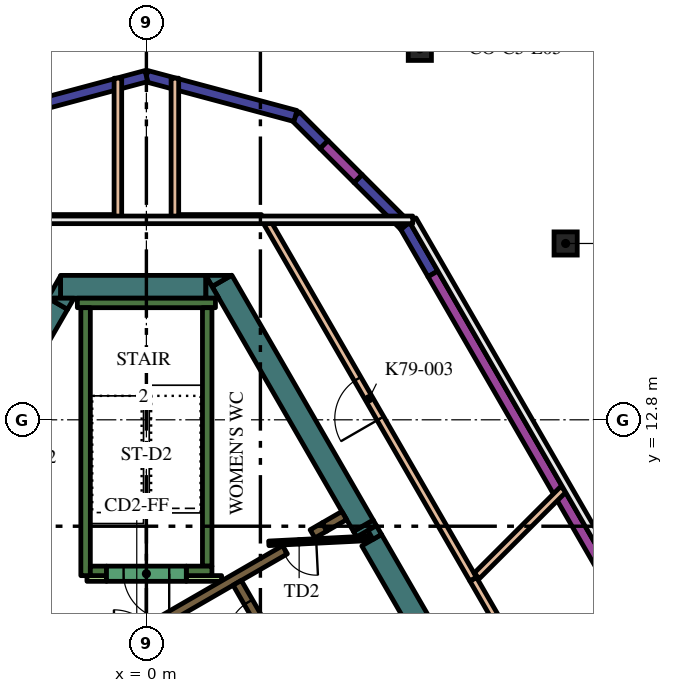
"""IFC4 building model, lengths in metres.
Left out: names, types, materials, properties, quantities, classifications, styles, units other than length and angle.
Written with IfcOpenShell. Run it as: python <this file> out.ifc"""

import sys

from ifc_helpers import new_model, si_unit, direction, frame, frame_2d, origin, origin_2d, place, context, subcontext, project, spatial, polyline, rectangle, hollow_circle, outline, extrude, element, fill, save


model = new_model("IFC4")
c1 = context("Model", 3, precision=1e-05, world=origin(), true_north=direction((0.0, 1.0)))
c2 = subcontext(c1, "Body", "Model", "MODEL_VIEW")
j1 = project(units=[si_unit("LENGTHUNIT", "METRE"), si_unit("PLANEANGLEUNIT", "RADIAN")], contexts=[c1])
p1 = place(None, origin())
s1 = spatial("IfcSite", under=j1, at=p1, CompositionType="ELEMENT")
p2 = place(p1, origin())
s2 = spatial("IfcBuilding", under=s1, at=p2, CompositionType="ELEMENT")
p3 = place(p2, frame((0.0, 0.0, 340.2)))
s3 = spatial("IfcBuildingStorey", under=s2, at=p3, CompositionType="ELEMENT", Elevation=340.2)
for number, where, z_axis, x_axis in (
    (1, (11.032, 17.44, 0.0), (0.0, 0.0, 1.0), (1.0, 0.0, 0.0)),
    (2, (7.195, 22.561, 0.0), (0.0, 0.0, 1.0), (1.0, 0.0, 0.0)),
):
    element("IfcColumn", number, at=place(p3, frame(where, z_axis=z_axis, x_axis=x_axis)), inside=s3, PredefinedType="COLUMN", context=c2, shape_type="SweptSolid", body=[
        extrude(hollow_circle(Radius=0.305, WallThickness=0.025, at=origin_2d()), origin(), (0.0, 0.0, 1.0), 4.2),
    ])
p4 = place(p3, frame((5.709, 10.012, 0.0), z_axis=(0.0, 0.0, 1.0), x_axis=(0.500399834964, -0.865794435861, 0.0)))
e3 = element("IfcWall", 3, at=p4, inside=s3, PredefinedType="SOLIDWALL", context=c2, shape_type="SweptSolid", body=[
    extrude(rectangle(XDim=0.166, YDim=0.6, at=frame_2d((0.083, 0.0))), origin(), (0.0, 0.0, 1.0), 4.2),
])
p5 = place(p3, frame((5.928, 9.633, 0.0), z_axis=(0.0, 0.0, 1.0), x_axis=(0.499983823482, -0.8660347431, 0.0)))
e4 = element("IfcWall", 4, at=p5, inside=s3, PredefinedType="SOLIDWALL", context=c2, shape_type="SweptSolid", body=[
    extrude(rectangle(XDim=4.528, YDim=0.6, at=frame_2d((2.264, 0.0))), origin(), (0.0, 0.0, 1.0), 4.2),
])
p6 = place(p3, origin())
e5 = element("IfcWall", 5, at=p6, inside=s3, PredefinedType="SOLIDWALL", context=c2, shape_type="SweptSolid", body=[
    extrude(outline(polyline([(6.053, 10.016), (6.187, 9.784), (5.961, 9.654), (5.827, 9.886), (6.053, 10.016)])), origin(), (0.0, 0.0, 1.0), 4.2),
])
p7 = place(p3, frame((1.989, 16.456, 0.0), z_axis=(0.0, 0.0, 1.0), x_axis=(0.499990476767, -0.866030901956, 0.0)))
e6 = element("IfcWall", 6, at=p7, inside=s3, PredefinedType="SOLIDWALL", context=c2, shape_type="SweptSolid", body=[
    extrude(rectangle(XDim=7.438, YDim=0.6, at=frame_2d((3.719, 0.0))), origin(), (0.0, 0.0, 1.0), 4.2),
])
e7 = element("IfcWall", 7, at=p6, inside=s3, PredefinedType="SOLIDWALL", context=c2, shape_type="SweptSolid", body=[
    extrude(outline(polyline([(1.559, 16.6), (2.235, 16.6), (1.728, 16.307), (1.559, 16.6)])), origin(), (0.0, 0.0, 1.0), 4.2),
])
p8 = place(p3, frame((-2.258, 16.3, 0.0), z_axis=(0.0, 0.0, 1.0), x_axis=(1.0, 0.0, 0.0)))
e8 = element("IfcWall", 8, at=p8, inside=s3, PredefinedType="SOLIDWALL", context=c2, shape_type="SweptSolid", body=[
    extrude(rectangle(XDim=3.823, YDim=0.6, at=frame_2d((1.912, 0.0))), origin(), (0.0, 0.0, 1.0), 4.2),
])
e9 = element("IfcWall", 9, at=p6, inside=s3, PredefinedType="SOLIDWALL", context=c2, shape_type="SweptSolid", body=[
    extrude(outline(polyline([(1.905, 16.0), (1.567, 16.0), (1.567, 16.585), (1.905, 16.0)])), origin(), (0.0, 0.0, 1.0), 4.2),
])
e10 = element("IfcWall", 10, at=p6, inside=s3, PredefinedType="SOLIDWALL", context=c2, shape_type="SweptSolid", body=[
    extrude(outline(polyline([(-2.598, 16.0), (-2.26, 16.585), (-2.26, 16.0), (-2.598, 16.0)])), origin(), (0.0, 0.0, 1.0), 4.2),
])
p9 = place(p3, frame((-2.335, 15.855, 0.0), z_axis=(0.0, 0.0, 1.0), x_axis=(-0.499960127962, -0.866048422692, 0.0)))
e11 = element("IfcWall", 11, at=p9, inside=s3, PredefinedType="SOLIDWALL", context=c2, shape_type="SweptSolid", body=[
    extrude(rectangle(XDim=2.934, YDim=0.6, at=frame_2d((1.467, 0.0))), origin(), (0.0, 0.0, 1.0), 4.2),
])
e12 = element("IfcWall", 12, at=p6, inside=s3, PredefinedType="SOLIDWALL", context=c2, shape_type="SweptSolid", body=[
    extrude(outline(polyline([(-1.905, 16.0), (-2.074, 15.707), (-2.581, 16.0), (-1.905, 16.0)])), origin(), (0.0, 0.0, 1.0), 4.2),
])
p10 = place(p3, frame((-1.817, 15.875, 0.0), z_axis=(0.0, 0.0, 1.0), x_axis=(1.0, 0.0, 0.0)))
e13 = element("IfcWall", 13, at=p10, inside=s3, PredefinedType="SOLIDWALL", context=c2, shape_type="SweptSolid", body=[
    extrude(rectangle(XDim=3.634, YDim=0.25, at=frame_2d((1.817, 0.0))), origin(), (0.0, 0.0, 1.0), 4.2),
])
p11 = place(p3, frame((1.6, 8.95, 0.0), z_axis=(0.0, 0.0, 1.0), x_axis=(0.0, 1.0, 0.0)))
e14 = element("IfcWall", 14, at=p11, inside=s3, PredefinedType="SOLIDWALL", context=c2, shape_type="SweptSolid", body=[
    extrude(rectangle(XDim=6.8, YDim=0.25, at=frame_2d((3.4, 0.0))), origin(), (0.0, 0.0, 1.0), 4.2),
])
p12 = place(p3, frame((1.05, 8.825, 0.0), z_axis=(0.0, 0.0, 1.0), x_axis=(1.0, 0.0, 0.0)))
e15 = element("IfcWall", 15, at=p12, inside=s3, PredefinedType="SOLIDWALL", context=c2, shape_type="SweptSolid", body=[
    extrude(rectangle(XDim=0.675, YDim=0.25, at=frame_2d((0.337, 0.0))), origin(), (0.0, 0.0, 1.0), 4.2),
])
p13 = place(p3, frame((-1.6, 8.7, 0.0), z_axis=(0.0, 0.0, 1.0), x_axis=(0.0, 1.0, 0.0)))
e16 = element("IfcWall", 16, at=p13, inside=s3, PredefinedType="SOLIDWALL", context=c2, shape_type="SweptSolid", body=[
    extrude(rectangle(XDim=7.05, YDim=0.25, at=frame_2d((3.525, 0.0))), origin(), (0.0, 0.0, 1.0), 4.2),
])
p14 = place(p3, frame((-1.475, 8.825, 0.0), z_axis=(0.0, 0.0, 1.0), x_axis=(1.0, 0.0, 0.0)))
e17 = element("IfcWall", 17, at=p14, inside=s3, PredefinedType="SOLIDWALL", context=c2, shape_type="SweptSolid", body=[
    extrude(rectangle(XDim=0.425, YDim=0.25, at=frame_2d((0.212, 0.0))), origin(), (0.0, 0.0, 1.0), 4.2),
])
p15 = place(p3, frame((3.647, 9.38, 0.0), z_axis=(0.0, 0.0, 1.0), x_axis=(-0.866027868628, -0.499995730742, 0.0)))
e18 = element("IfcWall", 18, at=p15, inside=s3, PredefinedType="SOLIDWALL", context=c2, shape_type="SweptSolid", body=[
    extrude(rectangle(XDim=4.099, YDim=0.25, at=frame_2d((2.049, 0.0))), origin(), (0.0, 0.0, 1.0), 4.2),
])
p16 = place(p3, frame((4.688, 9.981, 0.0), z_axis=(0.0, 0.0, 1.0), x_axis=(-0.865974312977, -0.500088481434, 0.0)))
e19 = element("IfcWall", 19, at=p16, inside=s3, PredefinedType="SOLIDWALL", context=c2, shape_type="SweptSolid", body=[
    extrude(rectangle(XDim=0.366, YDim=0.25, at=frame_2d((0.183, 0.0))), origin(), (0.0, 0.0, 1.0), 4.2),
])
p17 = place(p3, frame((4.689, 9.982, 0.0), z_axis=(0.0, 0.0, 1.0), x_axis=(0.865947592822, 0.500134748329, 0.0)))
e20 = element("IfcWall", 20, at=p17, inside=s3, PredefinedType="SOLIDWALL", context=c2, shape_type="SweptSolid", body=[
    extrude(rectangle(XDim=0.598, YDim=0.25, at=frame_2d((0.299, 0.0))), origin(), (0.0, 0.0, 1.0), 4.2),
])
p18 = place(p3, frame((1.05, 8.625, 0.0), z_axis=(0.0, 0.0, 1.0), x_axis=(1.0, 0.0, 0.0)))
e21 = element("IfcWall", 21, at=p18, inside=s3, PredefinedType="PARTITIONING", context=c2, shape_type="SweptSolid", body=[
    extrude(rectangle(XDim=0.929, YDim=0.15, at=frame_2d((0.464, 0.0))), origin(), (0.0, 0.0, 1.0), 3.45),
])
p19 = place(p3, frame((-1.564, 8.625, 0.0), z_axis=(0.0, 0.0, 1.0), x_axis=(1.0, 0.0, 0.0)))
e22 = element("IfcWall", 22, at=p19, inside=s3, PredefinedType="PARTITIONING", context=c2, shape_type="SweptSolid", body=[
    extrude(rectangle(XDim=0.514, YDim=0.15, at=frame_2d((0.257, 0.0))), origin(), (0.0, 0.0, 1.0), 3.45),
])
p20 = place(p3, frame((8.565, -2.185, 0.0), z_axis=(0.0, 0.0, 1.0), x_axis=(-0.499997954832, 0.866026584559, 0.0)))
e23 = element("IfcWall", 23, at=p20, inside=s3, PredefinedType="SOLIDWALL", context=c2, shape_type="SweptSolid", body=[
    extrude(rectangle(XDim=12.35, YDim=0.25, at=frame_2d((6.175, 0.0))), origin(), (0.0, 0.0, 1.0), 4.2),
])
p21 = place(p20, frame((0.685, 0.0, 0.0)))
e24 = element("IfcOpeningElement", 24, at=p21, cuts=e23, PredefinedType="OPENING", context=c2, shape_type="SweptSolid", body=[
    extrude(rectangle(XDim=0.9, YDim=2.1, at=frame_2d((0.45, 1.05))), frame((0.0, 0.135, 0.0), z_axis=(0.0, -1.0, 0.0), x_axis=(1.0, 0.0, 0.0)), (0.0, 0.0, 1.0), 0.27),
])
p22 = place(p20, frame((3.105, 0.0, 0.0)))
e25 = element("IfcOpeningElement", 25, at=p22, cuts=e23, PredefinedType="OPENING", context=c2, shape_type="SweptSolid", body=[
    extrude(rectangle(XDim=1.1, YDim=2.1, at=frame_2d((0.55, 1.05))), frame((0.0, 0.135, 0.0), z_axis=(0.0, -1.0, 0.0), x_axis=(1.0, 0.0, 0.0)), (0.0, 0.0, 1.0), 0.27),
])
p23 = place(p20, frame((5.625, 0.0, 0.0)))
e26 = element("IfcOpeningElement", 26, at=p23, cuts=e23, PredefinedType="OPENING", context=c2, shape_type="SweptSolid", body=[
    extrude(rectangle(XDim=1.1, YDim=2.1, at=frame_2d((0.55, 1.05))), frame((0.0, 0.135, 0.0), z_axis=(0.0, -1.0, 0.0), x_axis=(1.0, 0.0, 0.0)), (0.0, 0.0, 1.0), 0.27),
])
p24 = place(p20, frame((8.145, 0.0, 0.0)))
e27 = element("IfcOpeningElement", 27, at=p24, cuts=e23, PredefinedType="OPENING", context=c2, shape_type="SweptSolid", body=[
    extrude(rectangle(XDim=1.1, YDim=2.1, at=frame_2d((0.55, 1.05))), frame((0.0, 0.135, 0.0), z_axis=(0.0, -1.0, 0.0), x_axis=(1.0, 0.0, 0.0)), (0.0, 0.0, 1.0), 0.27),
])
p25 = place(p20, frame((10.665, 0.0, 0.0)))
e28 = element("IfcOpeningElement", 28, at=p25, cuts=e23, PredefinedType="OPENING", context=c2, shape_type="SweptSolid", body=[
    extrude(rectangle(XDim=1.1, YDim=2.1, at=frame_2d((0.55, 1.05))), frame((0.0, 0.135, 0.0), z_axis=(0.0, -1.0, 0.0), x_axis=(1.0, 0.0, 0.0)), (0.0, 0.0, 1.0), 0.27),
])
p26 = place(p3, frame((1.05, 8.75, 0.0), z_axis=(0.0, 0.0, 1.0), x_axis=(-1.0, 0.0, 0.0)))
e29 = element("IfcWall", 29, at=p26, inside=s3, PredefinedType="SOLIDWALL", context=c2, shape_type="SweptSolid", body=[
    extrude(rectangle(XDim=2.1, YDim=0.4, at=frame_2d((1.05, 0.0))), origin(), (0.0, 0.0, 1.0), 4.2),
])
p27 = place(p26, frame((0.45, 0.0, 0.0)))
e30 = element("IfcOpeningElement", 30, at=p27, cuts=e29, PredefinedType="OPENING", context=c2, shape_type="SweptSolid", body=[
    extrude(rectangle(XDim=1.2, YDim=2.1, at=frame_2d((0.6, 1.05))), frame((0.0, 0.21, 0.0), z_axis=(0.0, -1.0, 0.0), x_axis=(1.0, 0.0, 0.0)), (0.0, 0.0, 1.0), 0.42),
])
p28 = place(p3, frame((5.917, 9.684, 0.0), z_axis=(0.0, 0.0, 1.0), x_axis=(-0.998758194515, -0.049820366212, 0.0)))
e31 = element("IfcWall", 31, at=p28, inside=s3, PredefinedType="PARTITIONING", context=c2, shape_type="SweptSolid", body=[
    extrude(rectangle(XDim=2.7, YDim=0.12, at=frame_2d((1.35, 0.0))), origin(), (0.0, 0.0, 1.0), 3.45),
])
p29 = place(p28, frame((1.45, 0.0, 0.0)))
e32 = element("IfcOpeningElement", 32, at=p29, cuts=e31, PredefinedType="OPENING", context=c2, shape_type="SweptSolid", body=[
    extrude(rectangle(XDim=0.9, YDim=2.1, at=frame_2d((0.45, 1.05))), frame((0.0, 0.07, 0.0), z_axis=(0.0, -1.0, 0.0), x_axis=(1.0, 0.0, 0.0)), (0.0, 0.0, 1.0), 0.14),
])
p30 = place(p3, frame((17.234, -6.35, 0.0), z_axis=(0.0, 0.0, 1.0), x_axis=(-0.499992973356, 0.866029460581, 0.0)))
e33 = element("IfcWall", 33, at=p30, inside=s3, PredefinedType="PARTITIONING", context=c2, shape_type="SweptSolid", body=[
    extrude(rectangle(XDim=17.265, YDim=0.2, at=frame_2d((8.632, 0.0))), origin(), (0.0, 0.0, 1.0), 3.45),
])
p31 = place(p30, frame((8.032, 0.0, 0.0)))
e34 = element("IfcOpeningElement", 34, at=p31, cuts=e33, PredefinedType="OPENING", context=c2, shape_type="SweptSolid", body=[
    extrude(rectangle(XDim=1.2, YDim=2.1, at=frame_2d((0.6, 1.05))), frame((0.0, 0.11, 0.0), z_axis=(0.0, -1.0, 0.0), x_axis=(1.0, 0.0, 0.0)), (0.0, 0.0, 1.0), 0.22),
])
p32 = place(p3, frame((8.597, 8.61, 0.0), z_axis=(0.0, 0.0, 1.0), x_axis=(-0.499996953601, 0.866027162616, 0.0)))
e35 = element("IfcWall", 35, at=p32, inside=s3, PredefinedType="PARTITIONING", context=c2, shape_type="SweptSolid", body=[
    extrude(rectangle(XDim=10.958, YDim=0.2, at=frame_2d((5.479, 0.0))), origin(), (0.0, 0.0, 1.0), 3.45),
])
p33 = place(p32, frame((4.879, 0.0, 0.0)))
e36 = element("IfcOpeningElement", 36, at=p33, cuts=e35, PredefinedType="OPENING", context=c2, shape_type="SweptSolid", body=[
    extrude(rectangle(XDim=1.2, YDim=2.1, at=frame_2d((0.6, 1.05))), frame((0.0, 0.11, 0.0), z_axis=(0.0, -1.0, 0.0), x_axis=(1.0, 0.0, 0.0)), (0.0, 0.0, 1.0), 0.22),
])
for number, where, z_axis, x_axis in (
    (37, (0.75, 21.789, 0.0), (0.0, 0.0, 1.0), (0.0, -1.0, 0.0)),
    (38, (-0.75, 18.1, 0.0), (0.0, 0.0, 1.0), (0.0, 1.0, 0.0)),
):
    element("IfcWall", number, at=place(p3, frame(where, z_axis=z_axis, x_axis=x_axis)), inside=s3, PredefinedType="PARTITIONING", context=c2, shape_type="SweptSolid", body=[
        extrude(rectangle(XDim=3.688, YDim=0.2, at=frame_2d((1.844, 0.0))), origin(), (0.0, 0.0, 1.0), 3.45),
    ])
p34 = place(p3, frame((8.694, 8.694, 0.0), z_axis=(0.0, 0.0, 1.0), x_axis=(0.707106781187, 0.707106781187, 0.0)))
e39 = element("IfcWall", 39, at=p34, inside=s3, PredefinedType="PARTITIONING", context=c2, shape_type="SweptSolid", body=[
    extrude(rectangle(XDim=3.224, YDim=0.2, at=frame_2d((1.612, 0.0))), origin(), (0.0, 0.0, 1.0), 3.45),
])
for number, where, z_axis, x_axis in (
    (40, (-3.028, 18.1, 0.0), (0.0, 0.0, 1.0), (1.0, 0.0, 0.0)),
    (41, (0.85, 18.1, 0.0), (0.0, 0.0, 1.0), (1.0, 0.0, 0.0)),
):
    element("IfcWall", number, at=place(p3, frame(where, z_axis=z_axis, x_axis=x_axis)), inside=s3, PredefinedType="PARTITIONING", context=c2, shape_type="SweptSolid", body=[
        extrude(rectangle(XDim=2.177, YDim=0.2, at=frame_2d((1.089, 0.0))), origin(), (0.0, 0.0, 1.0), 3.45),
    ])
p35 = place(p3, frame((18.181, -1.79, 0.0), z_axis=(0.0, 0.0, 1.0), x_axis=(-0.500002158106, 0.866024157798, 0.0)))
e42 = element("IfcWall", 42, at=p35, inside=s3, PredefinedType="SOLIDWALL", context=c2, shape_type="SweptSolid", body=[
    extrude(rectangle(XDim=21.282, YDim=0.3, at=frame_2d((10.641, 0.0))), origin(), (0.0, 0.0, 1.0), 3.45),
])
p36 = place(p3, frame((7.54, 16.64, 0.0), z_axis=(0.0, 0.0, 1.0), x_axis=(-0.499977492351, 0.866038398192, 0.0)))
e43 = element("IfcWall", 43, at=p36, inside=s3, PredefinedType="SOLIDWALL", context=c2, shape_type="SweptSolid", body=[
    extrude(rectangle(XDim=1.464, YDim=0.3, at=frame_2d((0.732, 0.0))), origin(), (0.0, 0.0, 1.0), 3.95),
])
p37 = place(p3, frame((6.808, 17.908, 0.0), z_axis=(0.0, 0.0, 1.0), x_axis=(-0.707106781187, 0.707106781187, 0.0)))
e44 = element("IfcWall", 44, at=p37, inside=s3, PredefinedType="SOLIDWALL", context=c2, shape_type="SweptSolid", body=[
    extrude(rectangle(XDim=1.752, YDim=0.3, at=frame_2d((0.876, 0.0))), origin(), (0.0, 0.0, 1.0), 3.95),
])
p38 = place(p3, frame((5.569, 19.147, 0.0), z_axis=(0.0, 0.0, 1.0), x_axis=(-0.707106781187, 0.707106781187, 0.0)))
e45 = element("IfcWall", 45, at=p38, inside=s3, PredefinedType="SOLIDWALL", context=c2, shape_type="SweptSolid", body=[
    extrude(rectangle(XDim=1.264, YDim=0.3, at=frame_2d((0.632, 0.0))), origin(), (0.0, 0.0, 1.0), 3.45),
])
p39 = place(p3, frame((4.675, 20.041, 0.0), z_axis=(0.0, 0.0, 1.0), x_axis=(-0.707106781187, 0.707106781187, 0.0)))
e46 = element("IfcWall", 46, at=p39, inside=s3, PredefinedType="SOLIDWALL", context=c2, shape_type="SweptSolid", body=[
    extrude(rectangle(XDim=1.065, YDim=0.3, at=frame_2d((0.532, 0.0))), origin(), (0.0, 0.0, 1.0), 3.95),
])
for number, where, z_axis, x_axis in (
    (47, (3.922, 20.794, 0.0), (0.0, 0.0, 1.0), (-0.966, 0.259, 0.0)),
    (48, (0.0, 21.845, 0.0), (0.0, 0.0, 1.0), (-0.966, -0.259, 0.0)),
):
    element("IfcWall", number, at=place(p3, frame(where, z_axis=z_axis, x_axis=x_axis)), inside=s3, PredefinedType="SOLIDWALL", context=c2, shape_type="SweptSolid", body=[
        extrude(rectangle(XDim=4.061, YDim=0.3, at=frame_2d((2.03, 0.0))), origin(), (0.0, 0.0, 1.0), 3.95),
    ])
p40 = place(p25, origin())
e49 = element("IfcDoor", 49, at=p40, inside=s3, OperationType="DOUBLE_DOOR_SLIDING", PredefinedType="DOOR", context=c2, shape_type="SweptSolid", body=[
    extrude(rectangle(XDim=1.1, YDim=2.1, at=frame_2d((0.55, 1.05))), frame((0.0, 0.025, 0.0), z_axis=(0.0, -1.0, 0.0), x_axis=(1.0, 0.0, 0.0)), (0.0, 0.0, 1.0), 0.05),
])
fill(e28, e49)
p41 = place(p27, origin())
e50 = element("IfcDoor", 50, at=p41, inside=s3, OperationType="SINGLE_SWING_LEFT", PredefinedType="DOOR", context=c2, shape_type="SweptSolid", body=[
    extrude(rectangle(XDim=1.2, YDim=2.1, at=frame_2d((0.6, 1.05))), frame((0.0, 0.025, 0.0), z_axis=(0.0, -1.0, 0.0), x_axis=(1.0, 0.0, 0.0)), (0.0, 0.0, 1.0), 0.05),
])
fill(e30, e50)
p42 = place(p29, origin())
e51 = element("IfcDoor", 51, at=p42, inside=s3, OperationType="SINGLE_SWING_LEFT", PredefinedType="DOOR", context=c2, shape_type="SweptSolid", body=[
    extrude(rectangle(XDim=0.9, YDim=2.1, at=frame_2d((0.45, 1.05))), frame((0.0, 0.025, 0.0), z_axis=(0.0, -1.0, 0.0), x_axis=(1.0, 0.0, 0.0)), (0.0, 0.0, 1.0), 0.05),
])
fill(e32, e51)
p43 = place(p33, origin())
e52 = element("IfcDoor", 52, at=p43, inside=s3, OperationType="SINGLE_SWING_RIGHT", PredefinedType="DOOR", context=c2, shape_type="SweptSolid", body=[
    extrude(rectangle(XDim=1.2, YDim=2.1, at=frame_2d((0.6, 1.05))), frame((0.0, 0.025, 0.0), z_axis=(0.0, -1.0, 0.0), x_axis=(1.0, 0.0, 0.0)), (0.0, 0.0, 1.0), 0.05),
])
fill(e36, e52)
save(model, sys.argv[1])
